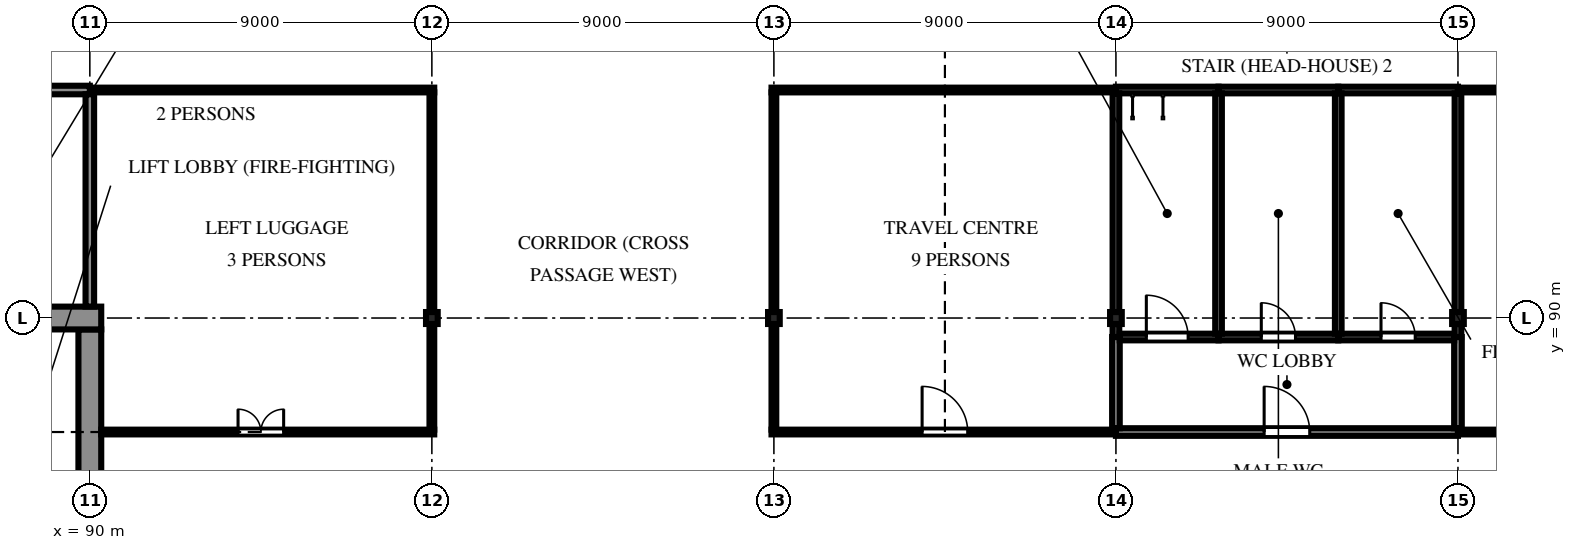
"""IFC4 building model, lengths in metres.
Left out: names, types, materials, properties, quantities, classifications, styles, units other than length and angle.
Written with IfcOpenShell. Run it as: python <this file> out.ifc"""

import sys

from ifc_helpers import new_model, si_unit, direction, frame, frame_2d, origin, origin_2d, place, context, subcontext, project, spatial, polyline, rectangle, i_section, outline, extrude, element, fill, save


model = new_model("IFC4")
c1 = context("Model", 3, precision=1e-05, world=origin(), true_north=direction((0.0, 1.0)))
c2 = subcontext(c1, "Body", "Model", "MODEL_VIEW")
j1 = project(units=[si_unit("LENGTHUNIT", "METRE"), si_unit("PLANEANGLEUNIT", "RADIAN")], contexts=[c1])
p1 = place(None, origin())
s1 = spatial("IfcSite", under=j1, at=p1, CompositionType="ELEMENT")
p2 = place(p1, origin())
s2 = spatial("IfcBuilding", under=s1, at=p2, CompositionType="ELEMENT")
p3 = place(p2, origin())
s3 = spatial("IfcBuildingStorey", under=s2, at=p3, CompositionType="ELEMENT", Elevation=0.0)
for number, where, z_axis, x_axis in (
    (1, (99.0, 90.0, -2.1), (0.0, 0.0, 1.0), (1.0, 0.0, 0.0)),
    (2, (108.0, 90.0, -2.1), (0.0, 0.0, 1.0), (1.0, 0.0, 0.0)),
    (3, (117.0, 90.0, -2.1), (0.0, 0.0, 1.0), (1.0, 0.0, 0.0)),
    (4, (126.0, 90.0, -2.1), (0.0, 0.0, 1.0), (1.0, 0.0, 0.0)),
):
    element("IfcColumn", number, at=place(p3, frame(where, z_axis=z_axis, x_axis=x_axis)), inside=s3, PredefinedType="COLUMN", context=c2, shape_type="SweptSolid", body=[
        extrude(i_section(OverallWidth=0.307, OverallDepth=0.314, WebThickness=0.012, FlangeThickness=0.019, FilletRadius=0.015, at=origin_2d()), origin(), (0.0, 0.0, 1.0), 9.6),
    ])
p4 = place(p3, frame((71.7, 90.0, -2.1), z_axis=(0.0, 0.0, 1.0), x_axis=(1.0, 0.0, 0.0)))
e5 = element("IfcWall", 5, at=p4, inside=s3, PredefinedType="SOLIDWALL", context=c2, shape_type="SweptSolid", body=[
    extrude(rectangle(XDim=18.6, YDim=0.6, at=frame_2d((9.3, 0.0))), origin(), (0.0, 0.0, 1.0), 9.6),
])
p5 = place(p3, frame((90.0, 81.3, -2.1), z_axis=(0.0, 0.0, 1.0), x_axis=(0.0, 1.0, 0.0)))
e6 = element("IfcWall", 6, at=p5, inside=s3, PredefinedType="SOLIDWALL", context=c2, shape_type="SweptSolid", body=[
    extrude(rectangle(XDim=8.4, YDim=0.6, at=frame_2d((4.2, 0.0))), origin(), (0.0, 0.0, 1.0), 9.6),
])
p6 = place(p5, frame((2.8, 0.0, 2.1)))
e7 = element("IfcOpeningElement", 7, at=p6, cuts=e6, PredefinedType="OPENING", context=c2, shape_type="SweptSolid", body=[
    extrude(rectangle(XDim=1.8, YDim=2.1, at=frame_2d((0.9, 1.05))), frame((0.0, 0.31, 0.0), z_axis=(0.0, -1.0, 0.0), x_axis=(1.0, 0.0, 0.0)), (0.0, 0.0, 1.0), 0.62),
])
p7 = place(p5, frame((0.55, 0.0, 2.1)))
e8 = element("IfcOpeningElement", 8, at=p7, cuts=e6, PredefinedType="OPENING", context=c2, shape_type="SweptSolid", body=[
    extrude(rectangle(XDim=0.9, YDim=2.1, at=frame_2d((0.45, 1.05))), frame((0.0, 0.31, 0.0), z_axis=(0.0, -1.0, 0.0), x_axis=(1.0, 0.0, 0.0)), (0.0, 0.0, 1.0), 0.62),
])
p8 = place(p3, frame((135.062, 96.0, 0.0), z_axis=(0.0, 0.0, 1.0), x_axis=(-1.0, 0.0, 0.0)))
e9 = element("IfcWall", 9, at=p8, inside=s3, PredefinedType="PARTITIONING", context=c2, shape_type="SweptSolid", body=[
    extrude(rectangle(XDim=9.062, YDim=0.125, at=frame_2d((4.531, 0.0))), origin(), (0.0, 0.0, 1.0), 6.757),
])
p9 = place(p3, frame((126.0, 96.0, 0.0), z_axis=(0.0, 0.0, 1.0), x_axis=(-1.0, 0.0, 0.0)))
e10 = element("IfcWall", 10, at=p9, inside=s3, PredefinedType="PARTITIONING", context=c2, shape_type="SweptSolid", body=[
    extrude(rectangle(XDim=3.15, YDim=0.175, at=frame_2d((1.575, 0.0))), origin(), (0.0, 0.0, 1.0), 6.459),
])
p10 = place(p3, frame((122.85, 96.0, 0.0), z_axis=(0.0, 0.0, 1.0), x_axis=(-1.0, 0.0, 0.0)))
e11 = element("IfcWall", 11, at=p10, inside=s3, PredefinedType="PARTITIONING", context=c2, shape_type="SweptSolid", body=[
    extrude(rectangle(XDim=3.15, YDim=0.175, at=frame_2d((1.575, 0.0))), origin(), (0.0, 0.0, 1.0), 6.459),
])
p11 = place(p3, frame((119.7, 96.0, 0.0), z_axis=(0.0, 0.0, 1.0), x_axis=(-1.0, 0.0, 0.0)))
e12 = element("IfcWall", 12, at=p11, inside=s3, PredefinedType="PARTITIONING", context=c2, shape_type="SweptSolid", body=[
    extrude(rectangle(XDim=2.7, YDim=0.175, at=frame_2d((1.35, 0.0))), origin(), (0.0, 0.0, 1.0), 6.459),
])
for number, where, z_axis, x_axis in (
    (13, (117.0, 96.0, 0.0), (0.0, 0.0, 1.0), (-1.0, 0.0, 0.0)),
    (14, (99.062, 96.0, 0.0), (0.0, 0.0, 1.0), (-1.0, 0.0, 0.0)),
):
    element("IfcWall", number, at=place(p3, frame(where, z_axis=z_axis, x_axis=x_axis)), inside=s3, PredefinedType="PARTITIONING", context=c2, shape_type="SweptSolid", body=[
        extrude(rectangle(XDim=9.062, YDim=0.125, at=frame_2d((4.531, 0.0))), origin(), (0.0, 0.0, 1.0), 6.757),
    ])
p12 = place(p3, frame((90.0, 96.0, 0.0), z_axis=(0.0, 0.0, 1.0), x_axis=(-1.0, 0.0, 0.0)))
e15 = element("IfcWall", 15, at=p12, inside=s3, PredefinedType="PARTITIONING", context=c2, shape_type="SweptSolid", body=[
    extrude(rectangle(XDim=9.0, YDim=0.225, at=frame_2d((4.5, 0.0))), origin(), (0.0, 0.0, 1.0), 6.6),
])
p13 = place(p12, frame((3.9, 0.0, 0.0)))
e16 = element("IfcOpeningElement", 16, at=p13, cuts=e15, PredefinedType="OPENING", context=c2, shape_type="SweptSolid", body=[
    extrude(rectangle(XDim=1.2, YDim=2.4, at=frame_2d((0.6, 1.2))), frame((0.0, 0.123, 0.0), z_axis=(0.0, -1.0, 0.0), x_axis=(1.0, 0.0, 0.0)), (0.0, 0.0, 1.0), 0.245),
])
p14 = place(p3, frame((117.0, 87.0, 0.0), z_axis=(0.0, 0.0, 1.0), x_axis=(1.0, 0.0, 0.0)))
e17 = element("IfcWall", 17, at=p14, inside=s3, PredefinedType="PARTITIONING", context=c2, shape_type="SweptSolid", body=[
    extrude(rectangle(XDim=9.0, YDim=0.2, at=frame_2d((4.5, 0.0))), origin(), (0.0, 0.0, 1.0), 6.6),
])
p15 = place(p14, frame((3.9, 0.0, 0.0)))
e18 = element("IfcOpeningElement", 18, at=p15, cuts=e17, PredefinedType="OPENING", context=c2, shape_type="SweptSolid", body=[
    extrude(rectangle(XDim=1.2, YDim=2.1, at=frame_2d((0.6, 1.05))), frame((0.0, 0.11, 0.0), z_axis=(0.0, -1.0, 0.0), x_axis=(1.0, 0.0, 0.0)), (0.0, 0.0, 1.0), 0.22),
])
p16 = place(p3, frame((126.0, 87.0, 0.0), z_axis=(0.0, 0.0, 1.0), x_axis=(1.0, 0.0, 0.0)))
e19 = element("IfcWall", 19, at=p16, inside=s3, PredefinedType="PARTITIONING", context=c2, shape_type="SweptSolid", body=[
    extrude(rectangle(XDim=9.062, YDim=0.125, at=frame_2d((4.531, 0.0))), origin(), (0.0, 0.0, 1.0), 6.757),
])
p17 = place(p16, frame((3.9, 0.0, 0.0)))
e20 = element("IfcOpeningElement", 20, at=p17, cuts=e19, PredefinedType="OPENING", context=c2, shape_type="SweptSolid", body=[
    extrude(rectangle(XDim=1.2, YDim=2.1, at=frame_2d((0.6, 1.05))), frame((0.0, 0.073, 0.0), z_axis=(0.0, -1.0, 0.0), x_axis=(1.0, 0.0, 0.0)), (0.0, 0.0, 1.0), 0.145),
])
p18 = place(p3, frame((107.938, 87.0, 0.0), z_axis=(0.0, 0.0, 1.0), x_axis=(1.0, 0.0, 0.0)))
e21 = element("IfcWall", 21, at=p18, inside=s3, PredefinedType="PARTITIONING", context=c2, shape_type="SweptSolid", body=[
    extrude(rectangle(XDim=9.062, YDim=0.125, at=frame_2d((4.531, 0.0))), origin(), (0.0, 0.0, 1.0), 6.757),
])
p19 = place(p18, frame((3.962, 0.0, 0.0)))
e22 = element("IfcOpeningElement", 22, at=p19, cuts=e21, PredefinedType="OPENING", context=c2, shape_type="SweptSolid", body=[
    extrude(rectangle(XDim=1.2, YDim=2.1, at=frame_2d((0.6, 1.05))), frame((0.0, 0.073, 0.0), z_axis=(0.0, -1.0, 0.0), x_axis=(1.0, 0.0, 0.0)), (0.0, 0.0, 1.0), 0.145),
])
p20 = place(p3, frame((90.302, 87.0, 0.0), z_axis=(0.0, 0.0, 1.0), x_axis=(1.0, 0.0, 0.0)))
e23 = element("IfcWall", 23, at=p20, inside=s3, PredefinedType="PARTITIONING", context=c2, shape_type="SweptSolid", body=[
    extrude(rectangle(XDim=8.76, YDim=0.125, at=frame_2d((4.38, 0.0))), origin(), (0.0, 0.0, 1.0), 6.757),
])
p21 = place(p20, frame((3.598, 0.0, 0.0)))
e24 = element("IfcOpeningElement", 24, at=p21, cuts=e23, PredefinedType="OPENING", context=c2, shape_type="SweptSolid", body=[
    extrude(rectangle(XDim=1.2, YDim=2.1, at=frame_2d((0.6, 1.05))), frame((0.0, 0.073, 0.0), z_axis=(0.0, -1.0, 0.0), x_axis=(1.0, 0.0, 0.0)), (0.0, 0.0, 1.0), 0.145),
])
p22 = place(p3, frame((108.0, 95.938, 0.0), z_axis=(0.0, 0.0, 1.0), x_axis=(0.0, -1.0, 0.0)))
e25 = element("IfcWall", 25, at=p22, inside=s3, PredefinedType="PARTITIONING", context=c2, shape_type="SweptSolid", body=[
    extrude(rectangle(XDim=5.78, YDim=0.125, at=frame_2d((2.89, 0.0))), origin(), (0.0, 0.0, 1.0), 6.757),
])
for number, where, z_axis, x_axis in (
    (26, (108.0, 89.843, 0.0), (0.0, 0.0, 1.0), (0.0, -1.0, 0.0)),
    (27, (99.0, 87.062, 0.0), (0.0, 0.0, 1.0), (0.0, 1.0, 0.0)),
):
    element("IfcWall", number, at=place(p3, frame(where, z_axis=z_axis, x_axis=x_axis)), inside=s3, PredefinedType="PARTITIONING", context=c2, shape_type="SweptSolid", body=[
        extrude(rectangle(XDim=2.78, YDim=0.125, at=frame_2d((1.39, 0.0))), origin(), (0.0, 0.0, 1.0), 6.757),
    ])
p23 = place(p3, frame((99.0, 90.157, 0.0), z_axis=(0.0, 0.0, 1.0), x_axis=(0.0, 1.0, 0.0)))
e28 = element("IfcWall", 28, at=p23, inside=s3, PredefinedType="PARTITIONING", context=c2, shape_type="SweptSolid", body=[
    extrude(rectangle(XDim=5.78, YDim=0.125, at=frame_2d((2.89, 0.0))), origin(), (0.0, 0.0, 1.0), 6.757),
])
p24 = place(p3, frame((90.0, 95.887, 0.0), z_axis=(0.0, 0.0, 1.0), x_axis=(0.0, -1.0, 0.0)))
e29 = element("IfcWall", 29, at=p24, inside=s3, PredefinedType="PARTITIONING", context=c2, shape_type="SweptSolid", body=[
    extrude(rectangle(XDim=5.585, YDim=0.225, at=frame_2d((2.793, 0.0))), origin(), (0.0, 0.0, 1.0), 6.6),
])
p25 = place(p3, frame((117.0, 89.5, 0.0), z_axis=(0.0, 0.0, 1.0), x_axis=(0.0, -1.0, 0.0)))
e30 = element("IfcWall", 30, at=p25, inside=s3, PredefinedType="PARTITIONING", context=c2, shape_type="SweptSolid", body=[
    extrude(rectangle(XDim=2.4, YDim=0.2, at=frame_2d((1.2, 0.0))), origin(), (0.0, 0.0, 1.0), 6.6),
])
p26 = place(p3, frame((117.0, 95.913, 0.0), z_axis=(0.0, 0.0, 1.0), x_axis=(0.0, -1.0, 0.0)))
e31 = element("IfcWall", 31, at=p26, inside=s3, PredefinedType="PARTITIONING", context=c2, shape_type="SweptSolid", body=[
    extrude(rectangle(XDim=5.755, YDim=0.175, at=frame_2d((2.878, 0.0))), origin(), (0.0, 0.0, 1.0), 6.459),
])
p27 = place(p3, frame((117.0, 89.843, 0.0), z_axis=(0.0, 0.0, 1.0), x_axis=(0.0, -1.0, 0.0)))
e32 = element("IfcWall", 32, at=p27, inside=s3, PredefinedType="PARTITIONING", context=c2, shape_type="SweptSolid", body=[
    extrude(rectangle(XDim=0.343, YDim=0.175, at=frame_2d((0.171, 0.0))), origin(), (0.0, 0.0, 1.0), 6.459),
])
p28 = place(p3, frame((126.0, 89.5, 0.0), z_axis=(0.0, 0.0, 1.0), x_axis=(0.0, -1.0, 0.0)))
e33 = element("IfcWall", 33, at=p28, inside=s3, PredefinedType="PARTITIONING", context=c2, shape_type="SweptSolid", body=[
    extrude(rectangle(XDim=2.4, YDim=0.2, at=frame_2d((1.2, 0.0))), origin(), (0.0, 0.0, 1.0), 6.6),
])
p29 = place(p3, frame((122.85, 89.5, 0.0), z_axis=(0.0, 0.0, 1.0), x_axis=(1.0, 0.0, 0.0)))
e34 = element("IfcWall", 34, at=p29, inside=s3, PredefinedType="PARTITIONING", context=c2, shape_type="SweptSolid", body=[
    extrude(rectangle(XDim=3.05, YDim=0.175, at=frame_2d((1.525, 0.0))), origin(), (0.0, 0.0, 1.0), 6.459),
])
p30 = place(p29, frame((1.125, 0.0, 0.0)))
e35 = element("IfcOpeningElement", 35, at=p30, cuts=e34, PredefinedType="OPENING", context=c2, shape_type="SweptSolid", body=[
    extrude(rectangle(XDim=0.9, YDim=2.1, at=frame_2d((0.45, 1.05))), frame((0.0, 0.097, 0.0), z_axis=(0.0, -1.0, 0.0), x_axis=(1.0, 0.0, 0.0)), (0.0, 0.0, 1.0), 0.195),
])
p31 = place(p3, frame((119.7, 89.5, 0.0), z_axis=(0.0, 0.0, 1.0), x_axis=(1.0, 0.0, 0.0)))
e36 = element("IfcWall", 36, at=p31, inside=s3, PredefinedType="PARTITIONING", context=c2, shape_type="SweptSolid", body=[
    extrude(rectangle(XDim=3.15, YDim=0.175, at=frame_2d((1.575, 0.0))), origin(), (0.0, 0.0, 1.0), 6.459),
])
p32 = place(p31, frame((1.125, 0.0, 0.0)))
e37 = element("IfcOpeningElement", 37, at=p32, cuts=e36, PredefinedType="OPENING", context=c2, shape_type="SweptSolid", body=[
    extrude(rectangle(XDim=0.9, YDim=2.1, at=frame_2d((0.45, 1.05))), frame((0.0, 0.097, 0.0), z_axis=(0.0, -1.0, 0.0), x_axis=(1.0, 0.0, 0.0)), (0.0, 0.0, 1.0), 0.195),
])
p33 = place(p3, frame((117.1, 89.5, 0.0), z_axis=(0.0, 0.0, 1.0), x_axis=(1.0, 0.0, 0.0)))
e38 = element("IfcWall", 38, at=p33, inside=s3, PredefinedType="PARTITIONING", context=c2, shape_type="SweptSolid", body=[
    extrude(rectangle(XDim=2.6, YDim=0.175, at=frame_2d((1.3, 0.0))), origin(), (0.0, 0.0, 1.0), 6.459),
])
p34 = place(p33, frame((0.7, 0.0, 0.0)))
e39 = element("IfcOpeningElement", 39, at=p34, cuts=e38, PredefinedType="OPENING", context=c2, shape_type="SweptSolid", body=[
    extrude(rectangle(XDim=1.1, YDim=2.1, at=frame_2d((0.55, 1.05))), frame((0.0, 0.097, 0.0), z_axis=(0.0, -1.0, 0.0), x_axis=(1.0, 0.0, 0.0)), (0.0, 0.0, 1.0), 0.195),
])
for number, where, z_axis, x_axis in (
    (40, (119.7, 95.913, 0.0), (0.0, 0.0, 1.0), (0.0, -1.0, 0.0)),
    (41, (122.85, 95.913, 0.0), (0.0, 0.0, 1.0), (0.0, -1.0, 0.0)),
):
    element("IfcWall", number, at=place(p3, frame(where, z_axis=z_axis, x_axis=x_axis)), inside=s3, PredefinedType="PARTITIONING", context=c2, shape_type="SweptSolid", body=[
        extrude(rectangle(XDim=6.325, YDim=0.175, at=frame_2d((3.163, 0.0))), origin(), (0.0, 0.0, 1.0), 6.459),
    ])
p35 = place(p3, frame((126.0, 95.913, 0.0), z_axis=(0.0, 0.0, 1.0), x_axis=(0.0, -1.0, 0.0)))
e42 = element("IfcWall", 42, at=p35, inside=s3, PredefinedType="PARTITIONING", context=c2, shape_type="SweptSolid", body=[
    extrude(rectangle(XDim=5.755, YDim=0.175, at=frame_2d((2.878, 0.0))), origin(), (0.0, 0.0, 1.0), 6.459),
])
p36 = place(p3, frame((126.0, 89.843, 0.0), z_axis=(0.0, 0.0, 1.0), x_axis=(0.0, -1.0, 0.0)))
e43 = element("IfcWall", 43, at=p36, inside=s3, PredefinedType="PARTITIONING", context=c2, shape_type="SweptSolid", body=[
    extrude(rectangle(XDim=0.343, YDim=0.175, at=frame_2d((0.171, 0.0))), origin(), (0.0, 0.0, 1.0), 6.459),
])
p37 = place(p21, origin())
e44 = element("IfcDoor", 44, at=p37, inside=s3, OperationType="DOUBLE_DOOR_SINGLE_SWING", PredefinedType="DOOR", context=c2, shape_type="SweptSolid", body=[
    extrude(outline(polyline([(0.0, 0.0), (0.07, 0.0), (0.07, 2.03), (1.13, 2.03), (1.13, 0.0), (1.2, 0.0), (1.2, 2.1), (0.0, 2.1), (0.0, 0.0)])), frame((0.0, 0.025, 0.0), z_axis=(0.0, -1.0, 0.0), x_axis=(1.0, 0.0, 0.0)), (0.0, 0.0, 1.0), 0.05),
    extrude(outline(polyline([(0.074, 0.01), (0.597, 0.01), (0.597, 2.026), (0.074, 2.026), (0.074, 0.01)]), holes=[polyline([(0.178, 0.373), (0.492, 0.373), (0.492, 1.784), (0.178, 1.784), (0.178, 0.373)])]), frame((0.0, 0.017, 0.0), z_axis=(0.0, -1.0, 0.0), x_axis=(1.0, 0.0, 0.0)), (0.0, 0.0, 1.0), 0.035),
    extrude(rectangle(XDim=0.314, YDim=1.411, at=frame_2d((0.335, 1.079))), frame((0.0, 0.009, 0.0), z_axis=(0.0, -1.0, 0.0), x_axis=(1.0, 0.0, 0.0)), (0.0, 0.0, 1.0), 0.017),
    extrude(outline(polyline([(0.603, 0.01), (1.126, 0.01), (1.126, 2.026), (0.603, 2.026), (0.603, 0.01)]), holes=[polyline([(0.708, 0.373), (1.021, 0.373), (1.021, 1.784), (0.708, 1.784), (0.708, 0.373)])]), frame((0.0, 0.017, 0.0), z_axis=(0.0, -1.0, 0.0), x_axis=(1.0, 0.0, 0.0)), (0.0, 0.0, 1.0), 0.035),
    extrude(rectangle(XDim=0.314, YDim=1.411, at=frame_2d((0.865, 1.079))), frame((0.0, 0.009, 0.0), z_axis=(0.0, -1.0, 0.0), x_axis=(1.0, 0.0, 0.0)), (0.0, 0.0, 1.0), 0.017),
])
fill(e24, e44)
p38 = place(p19, origin())
e45 = element("IfcDoor", 45, at=p38, inside=s3, OperationType="DOUBLE_DOOR_SINGLE_SWING", PredefinedType="DOOR", context=c2, shape_type="SweptSolid", body=[
    extrude(outline(polyline([(0.0, 0.0), (0.07, 0.0), (0.07, 2.03), (1.13, 2.03), (1.13, 0.0), (1.2, 0.0), (1.2, 2.1), (0.0, 2.1), (0.0, 0.0)])), frame((0.0, 0.025, 0.0), z_axis=(0.0, -1.0, 0.0), x_axis=(1.0, 0.0, 0.0)), (0.0, 0.0, 1.0), 0.05),
    extrude(outline(polyline([(0.074, 0.01), (0.597, 0.01), (0.597, 2.026), (0.074, 2.026), (0.074, 0.01)]), holes=[polyline([(0.178, 0.373), (0.492, 0.373), (0.492, 1.784), (0.178, 1.784), (0.178, 0.373)])]), frame((0.0, 0.017, 0.0), z_axis=(0.0, -1.0, 0.0), x_axis=(1.0, 0.0, 0.0)), (0.0, 0.0, 1.0), 0.035),
    extrude(rectangle(XDim=0.314, YDim=1.411, at=frame_2d((0.335, 1.079))), frame((0.0, 0.009, 0.0), z_axis=(0.0, -1.0, 0.0), x_axis=(1.0, 0.0, 0.0)), (0.0, 0.0, 1.0), 0.017),
    extrude(outline(polyline([(0.603, 0.01), (1.126, 0.01), (1.126, 2.026), (0.603, 2.026), (0.603, 0.01)]), holes=[polyline([(0.708, 0.373), (1.021, 0.373), (1.021, 1.784), (0.708, 1.784), (0.708, 0.373)])]), frame((0.0, 0.017, 0.0), z_axis=(0.0, -1.0, 0.0), x_axis=(1.0, 0.0, 0.0)), (0.0, 0.0, 1.0), 0.035),
    extrude(rectangle(XDim=0.314, YDim=1.411, at=frame_2d((0.865, 1.079))), frame((0.0, 0.009, 0.0), z_axis=(0.0, -1.0, 0.0), x_axis=(1.0, 0.0, 0.0)), (0.0, 0.0, 1.0), 0.017),
])
fill(e22, e45)
p39 = place(p15, origin())
e46 = element("IfcDoor", 46, at=p39, inside=s3, OperationType="DOUBLE_DOOR_SINGLE_SWING", PredefinedType="DOOR", context=c2, shape_type="SweptSolid", body=[
    extrude(outline(polyline([(0.0, 0.0), (0.07, 0.0), (0.07, 2.03), (1.13, 2.03), (1.13, 0.0), (1.2, 0.0), (1.2, 2.1), (0.0, 2.1), (0.0, 0.0)])), frame((0.0, 0.025, 0.0), z_axis=(0.0, -1.0, 0.0), x_axis=(1.0, 0.0, 0.0)), (0.0, 0.0, 1.0), 0.05),
    extrude(outline(polyline([(0.074, 0.01), (0.597, 0.01), (0.597, 2.026), (0.074, 2.026), (0.074, 0.01)]), holes=[polyline([(0.178, 0.373), (0.492, 0.373), (0.492, 1.784), (0.178, 1.784), (0.178, 0.373)])]), frame((0.0, 0.017, 0.0), z_axis=(0.0, -1.0, 0.0), x_axis=(1.0, 0.0, 0.0)), (0.0, 0.0, 1.0), 0.035),
    extrude(rectangle(XDim=0.314, YDim=1.411, at=frame_2d((0.335, 1.079))), frame((0.0, 0.009, 0.0), z_axis=(0.0, -1.0, 0.0), x_axis=(1.0, 0.0, 0.0)), (0.0, 0.0, 1.0), 0.017),
    extrude(outline(polyline([(0.603, 0.01), (1.126, 0.01), (1.126, 2.026), (0.603, 2.026), (0.603, 0.01)]), holes=[polyline([(0.708, 0.373), (1.021, 0.373), (1.021, 1.784), (0.708, 1.784), (0.708, 0.373)])]), frame((0.0, 0.017, 0.0), z_axis=(0.0, -1.0, 0.0), x_axis=(1.0, 0.0, 0.0)), (0.0, 0.0, 1.0), 0.035),
    extrude(rectangle(XDim=0.314, YDim=1.411, at=frame_2d((0.865, 1.079))), frame((0.0, 0.009, 0.0), z_axis=(0.0, -1.0, 0.0), x_axis=(1.0, 0.0, 0.0)), (0.0, 0.0, 1.0), 0.017),
])
fill(e18, e46)
p40 = place(p34, origin())
e47 = element("IfcDoor", 47, at=p40, inside=s3, OperationType="SINGLE_SWING_LEFT", PredefinedType="DOOR", context=c2, shape_type="SweptSolid", body=[
    extrude(outline(polyline([(0.0, 0.0), (0.07, 0.0), (0.07, 2.03), (1.03, 2.03), (1.03, 0.0), (1.1, 0.0), (1.1, 2.1), (0.0, 2.1), (0.0, 0.0)])), frame((0.0, 0.025, 0.0), z_axis=(0.0, -1.0, 0.0), x_axis=(1.0, 0.0, 0.0)), (0.0, 0.0, 1.0), 0.05),
    extrude(outline(polyline([(0.074, 0.01), (1.026, 0.01), (1.026, 2.026), (0.074, 2.026), (0.074, 0.01)]), holes=[polyline([(0.194, 0.16), (0.906, 0.16), (0.906, 1.01), (0.194, 1.01), (0.194, 0.16)]), polyline([(0.4, 1.16), (0.7, 1.16), (0.7, 1.76), (0.4, 1.76), (0.4, 1.16)])]), frame((0.0, 0.017, 0.0), z_axis=(0.0, -1.0, 0.0), x_axis=(1.0, 0.0, 0.0)), (0.0, 0.0, 1.0), 0.035),
    extrude(rectangle(XDim=0.712, YDim=0.85, at=frame_2d((0.55, 0.585))), frame((0.0, 0.009, 0.0), z_axis=(0.0, -1.0, 0.0), x_axis=(1.0, 0.0, 0.0)), (0.0, 0.0, 1.0), 0.017),
    extrude(rectangle(XDim=0.3, YDim=0.6, at=frame_2d((0.55, 1.46))), frame((0.0, 0.006, 0.0), z_axis=(0.0, -1.0, 0.0), x_axis=(1.0, 0.0, 0.0)), (0.0, 0.0, 1.0), 0.012),
])
fill(e39, e47)
p41 = place(p32, origin())
e48 = element("IfcDoor", 48, at=p41, inside=s3, OperationType="SINGLE_SWING_LEFT", PredefinedType="DOOR", context=c2, shape_type="SweptSolid", body=[
    extrude(outline(polyline([(0.0, 0.0), (0.07, 0.0), (0.07, 2.03), (0.83, 2.03), (0.83, 0.0), (0.9, 0.0), (0.9, 2.1), (0.0, 2.1), (0.0, 0.0)])), frame((0.0, 0.025, 0.0), z_axis=(0.0, -1.0, 0.0), x_axis=(1.0, 0.0, 0.0)), (0.0, 0.0, 1.0), 0.05),
    extrude(outline(polyline([(0.074, 0.01), (0.826, 0.01), (0.826, 2.026), (0.074, 2.026), (0.074, 0.01)]), holes=[polyline([(0.194, 0.16), (0.706, 0.16), (0.706, 1.01), (0.194, 1.01), (0.194, 0.16)]), polyline([(0.3, 1.16), (0.6, 1.16), (0.6, 1.76), (0.3, 1.76), (0.3, 1.16)])]), frame((0.0, 0.017, 0.0), z_axis=(0.0, -1.0, 0.0), x_axis=(1.0, 0.0, 0.0)), (0.0, 0.0, 1.0), 0.035),
    extrude(rectangle(XDim=0.512, YDim=0.85, at=frame_2d((0.45, 0.585))), frame((0.0, 0.009, 0.0), z_axis=(0.0, -1.0, 0.0), x_axis=(1.0, 0.0, 0.0)), (0.0, 0.0, 1.0), 0.017),
    extrude(rectangle(XDim=0.3, YDim=0.6, at=frame_2d((0.45, 1.46))), frame((0.0, 0.006, 0.0), z_axis=(0.0, -1.0, 0.0), x_axis=(1.0, 0.0, 0.0)), (0.0, 0.0, 1.0), 0.012),
])
fill(e37, e48)
p42 = place(p30, origin())
e49 = element("IfcDoor", 49, at=p42, inside=s3, OperationType="SINGLE_SWING_LEFT", PredefinedType="DOOR", context=c2, shape_type="SweptSolid", body=[
    extrude(outline(polyline([(0.0, 0.0), (0.07, 0.0), (0.07, 2.03), (0.83, 2.03), (0.83, 0.0), (0.9, 0.0), (0.9, 2.1), (0.0, 2.1), (0.0, 0.0)])), frame((0.0, 0.025, 0.0), z_axis=(0.0, -1.0, 0.0), x_axis=(1.0, 0.0, 0.0)), (0.0, 0.0, 1.0), 0.05),
    extrude(outline(polyline([(0.074, 0.01), (0.826, 0.01), (0.826, 2.026), (0.074, 2.026), (0.074, 0.01)]), holes=[polyline([(0.194, 0.16), (0.706, 0.16), (0.706, 1.01), (0.194, 1.01), (0.194, 0.16)]), polyline([(0.3, 1.16), (0.6, 1.16), (0.6, 1.76), (0.3, 1.76), (0.3, 1.16)])]), frame((0.0, 0.017, 0.0), z_axis=(0.0, -1.0, 0.0), x_axis=(1.0, 0.0, 0.0)), (0.0, 0.0, 1.0), 0.035),
    extrude(rectangle(XDim=0.512, YDim=0.85, at=frame_2d((0.45, 0.585))), frame((0.0, 0.009, 0.0), z_axis=(0.0, -1.0, 0.0), x_axis=(1.0, 0.0, 0.0)), (0.0, 0.0, 1.0), 0.017),
    extrude(rectangle(XDim=0.3, YDim=0.6, at=frame_2d((0.45, 1.46))), frame((0.0, 0.006, 0.0), z_axis=(0.0, -1.0, 0.0), x_axis=(1.0, 0.0, 0.0)), (0.0, 0.0, 1.0), 0.012),
])
fill(e35, e49)
save(model, sys.argv[1])
